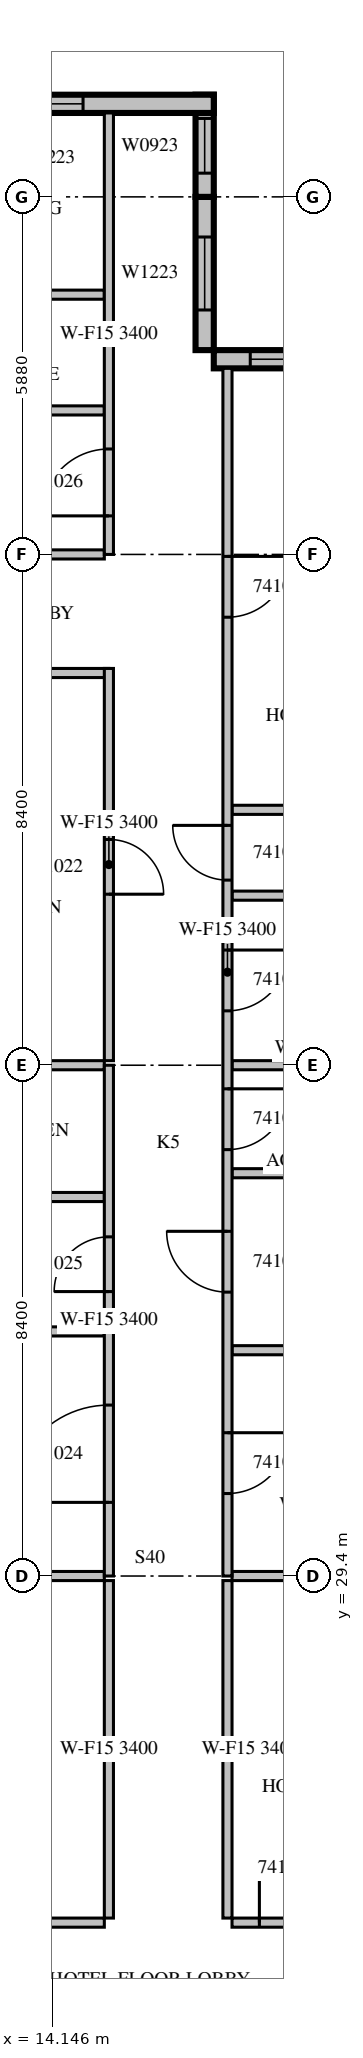
"""IFC4 building model, lengths in metres.
Left out: names, types, materials, properties, quantities, classifications, styles, units other than length and angle.
Written with IfcOpenShell. Run it as: python <this file> out.ifc"""

import sys

from ifc_helpers import new_model, si_unit, direction, frame, frame_2d, origin, place, context, subcontext, project, spatial, rectangle, extrude, source, transform, mapped, element, fill, save


model = new_model("IFC4")
c1 = context("Model", 3, precision=1e-05, world=origin(), true_north=direction((0.0, 1.0)))
c2 = subcontext(c1, "Body", "Model", "MODEL_VIEW")
j1 = project(units=[si_unit("LENGTHUNIT", "METRE"), si_unit("PLANEANGLEUNIT", "RADIAN")], contexts=[c1])
p1 = place(None, origin())
s1 = spatial("IfcSite", under=j1, at=p1, CompositionType="ELEMENT")
p2 = place(p1, origin())
s2 = spatial("IfcBuilding", under=s1, at=p2, CompositionType="ELEMENT")
p3 = place(p2, frame((0.0, 0.0, 189.2)))
s3 = spatial("IfcBuildingStorey", under=s2, at=p3, CompositionType="ELEMENT", Elevation=189.2)
m1 = source(origin(), c2, "Body", "SweptSolid", [
    extrude(rectangle(XDim=4.2, YDim=0.3, at=frame_2d((2.1, 0.0))), origin(), (0.0, 0.0, 1.0), 3.4),
])
p4 = place(p3, frame((21.0, 49.41, 0.0), z_axis=(0.0, 0.0, 1.0), x_axis=(-1.0, 0.0, 0.0)))
e1 = element("IfcWall", 1, at=p4, inside=s3, PredefinedType="STANDARD", context=c2, shape_type="MappedRepresentation", body=[
    mapped(m1, transform((0.0, 0.0, 0.0), scale=1.0)),
])
m2 = source(origin(), c2, "Body", "SweptSolid", [
    extrude(rectangle(XDim=3.0, YDim=2.3, at=frame_2d((1.5, 1.15))), frame((0.0, 0.16, 0.0), z_axis=(0.0, -1.0, 0.0), x_axis=(1.0, 0.0, 0.0)), (0.0, 0.0, 1.0), 0.32),
])
p5 = place(p4, frame((0.6, 0.0, 0.6)))
e2 = element("IfcOpeningElement", 2, at=p5, cuts=e1, PredefinedType="OPENING", context=c2, shape_type="MappedRepresentation", body=[
    mapped(m2, transform((0.0, 0.0, 0.0), scale=1.0)),
])
m3 = source(origin(), c2, "Body", "SweptSolid", [
    extrude(rectangle(XDim=2.52, YDim=0.3, at=frame_2d((1.26, 0.0))), origin(), (0.0, 0.0, 1.0), 3.4),
])
p6 = place(p3, frame((16.65, 49.56, 0.0), z_axis=(0.0, 0.0, 1.0), x_axis=(0.0, 1.0, 0.0)))
e3 = element("IfcWall", 3, at=p6, inside=s3, PredefinedType="STANDARD", context=c2, shape_type="MappedRepresentation", body=[
    mapped(m3, transform((0.0, 0.0, 0.0), scale=1.0)),
])
m4 = source(origin(), c2, "Body", "SweptSolid", [
    extrude(rectangle(XDim=1.2, YDim=2.3, at=frame_2d((0.6, 1.15))), frame((0.0, 0.16, 0.0), z_axis=(0.0, -1.0, 0.0), x_axis=(1.0, 0.0, 0.0)), (0.0, 0.0, 1.0), 0.32),
])
p7 = place(p6, frame((0.66, 0.0, 0.6)))
e4 = element("IfcOpeningElement", 4, at=p7, cuts=e3, PredefinedType="OPENING", context=c2, shape_type="MappedRepresentation", body=[
    mapped(m4, transform((0.0, 0.0, 0.0), scale=1.0)),
])
m5 = source(origin(), c2, "Body", "SweptSolid", [
    extrude(rectangle(XDim=1.68, YDim=0.3, at=frame_2d((0.84, 0.0))), origin(), (0.0, 0.0, 1.0), 3.4),
])
p8 = place(p3, frame((16.65, 52.08, 0.0), z_axis=(0.0, 0.0, 1.0), x_axis=(0.0, 1.0, 0.0)))
e5 = element("IfcWall", 5, at=p8, inside=s3, PredefinedType="STANDARD", context=c2, shape_type="MappedRepresentation", body=[
    mapped(m5, transform((0.0, 0.0, 0.0), scale=1.0)),
])
m6 = source(origin(), c2, "Body", "SweptSolid", [
    extrude(rectangle(XDim=0.9, YDim=2.3, at=frame_2d((0.45, 1.15))), frame((0.0, 0.16, 0.0), z_axis=(0.0, -1.0, 0.0), x_axis=(1.0, 0.0, 0.0)), (0.0, 0.0, 1.0), 0.32),
])
p9 = place(p8, frame((0.39, 0.0, 0.6)))
e6 = element("IfcOpeningElement", 6, at=p9, cuts=e5, PredefinedType="OPENING", context=c2, shape_type="MappedRepresentation", body=[
    mapped(m6, transform((0.0, 0.0, 0.0), scale=1.0)),
])
m7 = source(origin(), c2, "Body", "SweptSolid", [
    extrude(rectangle(XDim=10.5, YDim=0.3, at=frame_2d((5.25, 0.0))), origin(), (0.0, 0.0, 1.0), 3.4),
])
p10 = place(p3, frame((16.8, 53.61, 0.0), z_axis=(0.0, 0.0, 1.0), x_axis=(-1.0, 0.0, 0.0)))
e7 = element("IfcWall", 7, at=p10, inside=s3, PredefinedType="STANDARD", context=c2, shape_type="MappedRepresentation", body=[
    mapped(m7, transform((0.0, 0.0, 0.0), scale=1.0)),
])
p11 = place(p10, frame((2.15, 0.0, 0.6)))
e8 = element("IfcOpeningElement", 8, at=p11, cuts=e7, PredefinedType="OPENING", context=c2, shape_type="MappedRepresentation", body=[
    mapped(m4, transform((0.0, 0.0, 0.0), scale=1.0)),
])
m8 = source(origin(), c2, "Body", "SweptSolid", [
    extrude(rectangle(XDim=1.8, YDim=2.3, at=frame_2d((0.9, 1.15))), frame((0.0, 0.16, 0.0), z_axis=(0.0, -1.0, 0.0), x_axis=(1.0, 0.0, 0.0)), (0.0, 0.0, 1.0), 0.32),
])
p12 = place(p10, frame((8.025, 0.0, 0.6)))
e9 = element("IfcOpeningElement", 9, at=p12, cuts=e7, PredefinedType="OPENING", context=c2, shape_type="MappedRepresentation", body=[
    mapped(m8, transform((0.0, 0.0, 0.0), scale=1.0)),
])
m9 = source(origin(), c2, "Body", "SweptSolid", [
    extrude(rectangle(XDim=4.295, YDim=0.15, at=frame_2d((2.147, 0.0))), origin(), (0.0, 0.0, 1.0), 3.4),
])
p13 = place(p3, frame((10.705, 23.7, 0.0), z_axis=(0.0, 0.0, 1.0), x_axis=(1.0, 0.0, 0.0)))
e10 = element("IfcWall", 10, at=p13, inside=s3, PredefinedType="PARTITIONING", context=c2, shape_type="MappedRepresentation", body=[
    mapped(m9, transform((0.0, 0.0, 0.0), scale=1.0)),
])
m10 = source(origin(), c2, "Body", "SweptSolid", [
    extrude(rectangle(XDim=0.9, YDim=2.1, at=frame_2d((0.45, 1.05))), frame((0.0, 0.085, 0.0), z_axis=(0.0, -1.0, 0.0), x_axis=(1.0, 0.0, 0.0)), (0.0, 0.0, 1.0), 0.17),
])
p14 = place(p13, frame((2.283, 0.0, 0.0)))
e11 = element("IfcOpeningElement", 11, at=p14, cuts=e10, PredefinedType="OPENING", context=c2, shape_type="MappedRepresentation", body=[
    mapped(m10, transform((0.0, 0.0, 0.0), scale=1.0)),
])
m11 = source(origin(), c2, "Body", "SweptSolid", [
    extrude(rectangle(XDim=3.6, YDim=0.15, at=frame_2d((1.8, 0.0))), origin(), (0.0, 0.0, 1.0), 3.4),
])
p15 = place(p3, frame((17.1, 23.7, 0.0), z_axis=(0.0, 0.0, 1.0), x_axis=(1.0, 0.0, 0.0)))
e12 = element("IfcWall", 12, at=p15, inside=s3, PredefinedType="PARTITIONING", context=c2, shape_type="MappedRepresentation", body=[
    mapped(m11, transform((0.0, 0.0, 0.0), scale=1.0)),
])
p16 = place(p15, frame((0.45, 0.0, 0.0)))
e13 = element("IfcOpeningElement", 13, at=p16, cuts=e12, PredefinedType="OPENING", context=c2, shape_type="MappedRepresentation", body=[
    mapped(m10, transform((0.0, 0.0, 0.0), scale=1.0)),
])
m12 = source(origin(), c2, "Body", "SweptSolid", [
    extrude(rectangle(XDim=5.55, YDim=0.15, at=frame_2d((2.775, 0.0))), origin(), (0.0, 0.0, 1.0), 3.4),
])
for number, where, z_axis, x_axis in (
    (14, (15.075, 23.775, 0.0), (0.0, 0.0, 1.0), (0.0, 1.0, 0.0)),
    (15, (17.025, 29.325, 0.0), (0.0, 0.0, 1.0), (0.0, -1.0, 0.0)),
):
    element("IfcWall", number, at=place(p3, frame(where, z_axis=z_axis, x_axis=x_axis)), inside=s3, PredefinedType="PARTITIONING", context=c2, shape_type="MappedRepresentation", body=[
        mapped(m12, transform((0.0, 0.0, 0.0), scale=1.0)),
    ])
m13 = source(origin(), c2, "Body", "SweptSolid", [
    extrude(rectangle(XDim=4.051, YDim=0.15, at=frame_2d((2.026, 0.0))), origin(), (0.0, 0.0, 1.0), 3.4),
])
p17 = place(p3, frame((15.0, 29.4, 0.0), z_axis=(0.0, 0.0, 1.0), x_axis=(-1.0, 0.0, 0.0)))
e16 = element("IfcWall", 16, at=p17, inside=s3, PredefinedType="PARTITIONING", context=c2, shape_type="MappedRepresentation", body=[
    mapped(m13, transform((0.0, 0.0, 0.0), scale=1.0)),
])
m14 = source(origin(), c2, "Body", "SweptSolid", [
    extrude(rectangle(XDim=3.001, YDim=0.15, at=frame_2d((1.5, 0.0))), origin(), (0.0, 0.0, 1.0), 3.4),
])
p18 = place(p3, frame((20.101, 29.4, 0.0), z_axis=(0.0, 0.0, 1.0), x_axis=(-1.0, 0.0, 0.0)))
e17 = element("IfcWall", 17, at=p18, inside=s3, PredefinedType="PARTITIONING", context=c2, shape_type="MappedRepresentation", body=[
    mapped(m14, transform((0.0, 0.0, 0.0), scale=1.0)),
])
m15 = source(origin(), c2, "Body", "SweptSolid", [
    extrude(rectangle(XDim=3.175, YDim=0.15, at=frame_2d((1.587, 0.0))), origin(), (0.0, 0.0, 1.0), 3.4),
])
p19 = place(p3, frame((15.075, 44.25, 0.0), z_axis=(0.0, 0.0, 1.0), x_axis=(-1.0, 0.0, 0.0)))
e18 = element("IfcWall", 18, at=p19, inside=s3, PredefinedType="PARTITIONING", context=c2, shape_type="MappedRepresentation", body=[
    mapped(m15, transform((0.0, 0.0, 0.0), scale=1.0)),
])
m16 = source(origin(), c2, "Body", "SweptSolid", [
    extrude(rectangle(XDim=6.45, YDim=0.15, at=frame_2d((3.225, 0.0))), origin(), (0.0, 0.0, 1.0), 3.4),
])
p20 = place(p3, frame((15.075, 37.875, 0.0), z_axis=(0.0, 0.0, 1.0), x_axis=(0.0, 1.0, 0.0)))
e19 = element("IfcWall", 19, at=p20, inside=s3, PredefinedType="PARTITIONING", context=c2, shape_type="MappedRepresentation", body=[
    mapped(m16, transform((0.0, 0.0, 0.0), scale=1.0)),
])
p21 = place(p20, frame((2.737, 0.0, 0.0)))
e20 = element("IfcOpeningElement", 20, at=p21, cuts=e19, PredefinedType="OPENING", context=c2, shape_type="MappedRepresentation", body=[
    mapped(m10, transform((0.0, 0.0, 0.0), scale=1.0)),
])
p22 = place(p3, frame((15.0, 33.422, 0.0), z_axis=(0.0, 0.0, 1.0), x_axis=(-1.0, 0.0, 0.0)))
e21 = element("IfcWall", 21, at=p22, inside=s3, PredefinedType="PARTITIONING", context=c2, shape_type="MappedRepresentation", body=[
    mapped(m9, transform((0.0, 0.0, 0.0), scale=1.0)),
])
p23 = place(p3, frame((15.0, 35.633, 0.0), z_axis=(0.0, 0.0, 1.0), x_axis=(-1.0, 0.0, 0.0)))
e22 = element("IfcWall", 22, at=p23, inside=s3, PredefinedType="PARTITIONING", context=c2, shape_type="MappedRepresentation", body=[
    mapped(m9, transform((0.0, 0.0, 0.0), scale=1.0)),
])
p24 = place(p23, frame((1.698, 0.0, 0.0)))
e23 = element("IfcOpeningElement", 23, at=p24, cuts=e22, PredefinedType="OPENING", context=c2, shape_type="MappedRepresentation", body=[
    mapped(m10, transform((0.0, 0.0, 0.0), scale=1.0)),
])
p25 = place(p3, frame((15.0, 37.8, 0.0), z_axis=(0.0, 0.0, 1.0), x_axis=(-1.0, 0.0, 0.0)))
e24 = element("IfcWall", 24, at=p25, inside=s3, PredefinedType="PARTITIONING", context=c2, shape_type="MappedRepresentation", body=[
    mapped(m13, transform((0.0, 0.0, 0.0), scale=1.0)),
])
m17 = source(origin(), c2, "Body", "SweptSolid", [
    extrude(rectangle(XDim=3.9, YDim=0.15, at=frame_2d((1.95, 0.0))), origin(), (0.0, 0.0, 1.0), 3.4),
])
for number, where, z_axis, x_axis in (
    (25, (15.0, 48.568, 0.0), (0.0, 0.0, 1.0), (-1.0, 0.0, 0.0)),
    (26, (15.0, 50.472, 0.0), (0.0, 0.0, 1.0), (-1.0, 0.0, 0.0)),
    (27, (15.0, 46.2, 0.0), (0.0, 0.0, 1.0), (-1.0, 0.0, 0.0)),
):
    element("IfcWall", number, at=place(p3, frame(where, z_axis=z_axis, x_axis=x_axis)), inside=s3, PredefinedType="PARTITIONING", context=c2, shape_type="MappedRepresentation", body=[
        mapped(m17, transform((0.0, 0.0, 0.0), scale=1.0)),
    ])
for number, where, z_axis, x_axis in (
    (28, (17.1, 33.113, 0.0), (0.0, 0.0, 1.0), (1.0, 0.0, 0.0)),
    (29, (17.1, 36.024, 0.0), (0.0, 0.0, 1.0), (1.0, 0.0, 0.0)),
    (30, (17.1, 40.589, 0.0), (0.0, 0.0, 1.0), (1.0, 0.0, 0.0)),
):
    element("IfcWall", number, at=place(p3, frame(where, z_axis=z_axis, x_axis=x_axis)), inside=s3, PredefinedType="PARTITIONING", context=c2, shape_type="MappedRepresentation", body=[
        mapped(m11, transform((0.0, 0.0, 0.0), scale=1.0)),
    ])
p26 = place(p3, frame((20.101, 37.8, 0.0), z_axis=(0.0, 0.0, 1.0), x_axis=(-1.0, 0.0, 0.0)))
e31 = element("IfcWall", 31, at=p26, inside=s3, PredefinedType="PARTITIONING", context=c2, shape_type="MappedRepresentation", body=[
    mapped(m14, transform((0.0, 0.0, 0.0), scale=1.0)),
])
p27 = place(p3, frame((20.7, 42.0, 0.0), z_axis=(0.0, 0.0, 1.0), x_axis=(-1.0, 0.0, 0.0)))
e32 = element("IfcWall", 32, at=p27, inside=s3, PredefinedType="PARTITIONING", context=c2, shape_type="MappedRepresentation", body=[
    mapped(m11, transform((0.0, 0.0, 0.0), scale=1.0)),
])
m18 = source(origin(), c2, "Body", "SweptSolid", [
    extrude(rectangle(XDim=8.4, YDim=0.15, at=frame_2d((4.2, 0.0))), origin(), (0.0, 0.0, 1.0), 3.4),
])
p28 = place(p3, frame((15.075, 29.4, 0.0), z_axis=(0.0, 0.0, 1.0), x_axis=(0.0, 1.0, 0.0)))
e33 = element("IfcWall", 33, at=p28, inside=s3, PredefinedType="PARTITIONING", context=c2, shape_type="MappedRepresentation", body=[
    mapped(m18, transform((0.0, 0.0, 0.0), scale=1.0)),
])
m19 = source(origin(), c2, "Body", "SweptSolid", [
    extrude(rectangle(XDim=1.6, YDim=2.1, at=frame_2d((0.8, 1.05))), frame((0.0, 0.085, 0.0), z_axis=(0.0, -1.0, 0.0), x_axis=(1.0, 0.0, 0.0)), (0.0, 0.0, 1.0), 0.17),
])
p29 = place(p28, frame((1.211, 0.0, 0.0)))
e34 = element("IfcOpeningElement", 34, at=p29, cuts=e33, PredefinedType="OPENING", context=c2, shape_type="MappedRepresentation", body=[
    mapped(m19, transform((0.0, 0.0, 0.0), scale=1.0)),
])
p30 = place(p28, frame((4.678, 0.0, 0.0)))
e35 = element("IfcOpeningElement", 35, at=p30, cuts=e33, PredefinedType="OPENING", context=c2, shape_type="MappedRepresentation", body=[
    mapped(m10, transform((0.0, 0.0, 0.0), scale=1.0)),
])
m20 = source(origin(), c2, "Body", "SweptSolid", [
    extrude(rectangle(XDim=7.26, YDim=0.15, at=frame_2d((3.63, 0.0))), origin(), (0.0, 0.0, 1.0), 3.4),
])
p31 = place(p3, frame((15.075, 46.2, 0.0), z_axis=(0.0, 0.0, 1.0), x_axis=(0.0, 1.0, 0.0)))
e36 = element("IfcWall", 36, at=p31, inside=s3, PredefinedType="PARTITIONING", context=c2, shape_type="MappedRepresentation", body=[
    mapped(m20, transform((0.0, 0.0, 0.0), scale=1.0)),
])
m21 = source(origin(), c2, "Body", "SweptSolid", [
    extrude(rectangle(XDim=1.1, YDim=2.1, at=frame_2d((0.55, 1.05))), frame((0.0, 0.085, 0.0), z_axis=(0.0, -1.0, 0.0), x_axis=(1.0, 0.0, 0.0)), (0.0, 0.0, 1.0), 0.17),
])
p32 = place(p31, frame((0.634, 0.0, 0.0)))
e37 = element("IfcOpeningElement", 37, at=p32, cuts=e36, PredefinedType="OPENING", context=c2, shape_type="MappedRepresentation", body=[
    mapped(m21, transform((0.0, 0.0, 0.0), scale=1.0)),
])
m22 = source(origin(), c2, "Body", "SweptSolid", [
    extrude(rectangle(XDim=19.86, YDim=0.15, at=frame_2d((9.93, 0.0))), origin(), (0.0, 0.0, 1.0), 3.4),
])
p33 = place(p3, frame((17.025, 49.26, 0.0), z_axis=(0.0, 0.0, 1.0), x_axis=(0.0, -1.0, 0.0)))
e38 = element("IfcWall", 38, at=p33, inside=s3, PredefinedType="PARTITIONING", context=c2, shape_type="MappedRepresentation", body=[
    mapped(m22, transform((0.0, 0.0, 0.0), scale=1.0)),
])
m23 = source(origin(), c2, "Body", "SweptSolid", [
    extrude(rectangle(XDim=1.0, YDim=2.1, at=frame_2d((0.5, 1.05))), frame((0.0, 0.085, 0.0), z_axis=(0.0, -1.0, 0.0), x_axis=(1.0, 0.0, 0.0)), (0.0, 0.0, 1.0), 0.17),
])
p34 = place(p33, frame((17.503, 0.0, 0.0)))
e39 = element("IfcOpeningElement", 39, at=p34, cuts=e38, PredefinedType="OPENING", context=c2, shape_type="MappedRepresentation", body=[
    mapped(m23, transform((0.0, 0.0, 0.0), scale=1.0)),
])
p35 = place(p33, frame((14.191, 0.0, 0.0)))
e40 = element("IfcOpeningElement", 40, at=p35, cuts=e38, PredefinedType="OPENING", context=c2, shape_type="MappedRepresentation", body=[
    mapped(m23, transform((0.0, 0.0, 0.0), scale=1.0)),
])
p36 = place(p33, frame((11.848, 0.0, 0.0)))
e41 = element("IfcOpeningElement", 41, at=p36, cuts=e38, PredefinedType="OPENING", context=c2, shape_type="MappedRepresentation", body=[
    mapped(m23, transform((0.0, 0.0, 0.0), scale=1.0)),
])
p37 = place(p33, frame((9.566, 0.0, 0.0)))
e42 = element("IfcOpeningElement", 42, at=p37, cuts=e38, PredefinedType="OPENING", context=c2, shape_type="MappedRepresentation", body=[
    mapped(m23, transform((0.0, 0.0, 0.0), scale=1.0)),
])
p38 = place(p33, frame((7.516, 0.0, 0.0)))
e43 = element("IfcOpeningElement", 43, at=p38, cuts=e38, PredefinedType="OPENING", context=c2, shape_type="MappedRepresentation", body=[
    mapped(m10, transform((0.0, 0.0, 0.0), scale=1.0)),
])
p39 = place(p33, frame((3.092, 0.0, 0.0)))
e44 = element("IfcOpeningElement", 44, at=p39, cuts=e38, PredefinedType="OPENING", context=c2, shape_type="MappedRepresentation", body=[
    mapped(m23, transform((0.0, 0.0, 0.0), scale=1.0)),
])
m24 = source(origin(), c2, "Body", "SweptSolid", [
    extrude(rectangle(XDim=3.0, YDim=2.3, at=frame_2d((1.5, 1.15))), frame((0.0, 0.03, 0.0), z_axis=(0.0, -1.0, 0.0), x_axis=(1.0, 0.0, 0.0)), (0.0, 0.0, 1.0), 0.06),
])
p40 = place(p5, origin())
e45 = element("IfcWindow", 45, at=p40, inside=s3, PartitioningType="SINGLE_PANEL", PredefinedType="WINDOW", context=c2, shape_type="MappedRepresentation", body=[
    mapped(m24, transform((0.0, 0.0, 0.0), scale=1.0)),
])
fill(e2, e45)
m25 = source(origin(), c2, "Body", "SweptSolid", [
    extrude(rectangle(XDim=1.2, YDim=2.3, at=frame_2d((0.6, 1.15))), frame((0.0, 0.03, 0.0), z_axis=(0.0, -1.0, 0.0), x_axis=(1.0, 0.0, 0.0)), (0.0, 0.0, 1.0), 0.06),
])
p41 = place(p7, origin())
e46 = element("IfcWindow", 46, at=p41, inside=s3, PartitioningType="SINGLE_PANEL", PredefinedType="WINDOW", context=c2, shape_type="MappedRepresentation", body=[
    mapped(m25, transform((0.0, 0.0, 0.0), scale=1.0)),
])
fill(e4, e46)
m26 = source(origin(), c2, "Body", "SweptSolid", [
    extrude(rectangle(XDim=0.9, YDim=2.3, at=frame_2d((0.45, 1.15))), frame((0.0, 0.03, 0.0), z_axis=(0.0, -1.0, 0.0), x_axis=(1.0, 0.0, 0.0)), (0.0, 0.0, 1.0), 0.06),
])
p42 = place(p9, origin())
e47 = element("IfcWindow", 47, at=p42, inside=s3, PartitioningType="SINGLE_PANEL", PredefinedType="WINDOW", context=c2, shape_type="MappedRepresentation", body=[
    mapped(m26, transform((0.0, 0.0, 0.0), scale=1.0)),
])
fill(e6, e47)
p43 = place(p11, origin())
e48 = element("IfcWindow", 48, at=p43, inside=s3, PartitioningType="SINGLE_PANEL", PredefinedType="WINDOW", context=c2, shape_type="MappedRepresentation", body=[
    mapped(m25, transform((0.0, 0.0, 0.0), scale=1.0)),
])
fill(e8, e48)
m27 = source(origin(), c2, "Body", "SweptSolid", [
    extrude(rectangle(XDim=0.9, YDim=2.1, at=frame_2d((0.45, 1.05))), frame((0.0, 0.025, 0.0), z_axis=(0.0, -1.0, 0.0), x_axis=(1.0, 0.0, 0.0)), (0.0, 0.0, 1.0), 0.05),
])
p44 = place(p16, origin())
e49 = element("IfcDoor", 49, at=p44, inside=s3, OperationType="SINGLE_SWING_LEFT", PredefinedType="DOOR", context=c2, shape_type="MappedRepresentation", body=[
    mapped(m27, transform((0.0, 0.0, 0.0), scale=1.0)),
])
fill(e13, e49)
p45 = place(p21, origin())
e50 = element("IfcDoor", 50, at=p45, inside=s3, OperationType="SINGLE_SWING_RIGHT", PredefinedType="DOOR", context=c2, shape_type="MappedRepresentation", body=[
    mapped(m27, transform((0.0, 0.0, 0.0), scale=1.0)),
])
fill(e20, e50)
m28 = source(origin(), c2, "Body", "SweptSolid", [
    extrude(rectangle(XDim=1.6, YDim=2.1, at=frame_2d((0.8, 1.05))), frame((0.0, 0.025, 0.0), z_axis=(0.0, -1.0, 0.0), x_axis=(1.0, 0.0, 0.0)), (0.0, 0.0, 1.0), 0.05),
])
p46 = place(p29, origin())
e51 = element("IfcDoor", 51, at=p46, inside=s3, OperationType="SINGLE_SWING_LEFT", PredefinedType="DOOR", context=c2, shape_type="MappedRepresentation", body=[
    mapped(m28, transform((0.0, 0.0, 0.0), scale=1.0)),
])
fill(e34, e51)
p47 = place(p30, origin())
e52 = element("IfcDoor", 52, at=p47, inside=s3, OperationType="SINGLE_SWING_LEFT", PredefinedType="DOOR", context=c2, shape_type="MappedRepresentation", body=[
    mapped(m27, transform((0.0, 0.0, 0.0), scale=1.0)),
])
fill(e35, e52)
m29 = source(origin(), c2, "Body", "SweptSolid", [
    extrude(rectangle(XDim=1.1, YDim=2.1, at=frame_2d((0.55, 1.05))), frame((0.0, 0.025, 0.0), z_axis=(0.0, -1.0, 0.0), x_axis=(1.0, 0.0, 0.0)), (0.0, 0.0, 1.0), 0.05),
])
p48 = place(p32, origin())
e53 = element("IfcDoor", 53, at=p48, inside=s3, OperationType="SINGLE_SWING_LEFT", PredefinedType="DOOR", context=c2, shape_type="MappedRepresentation", body=[
    mapped(m29, transform((0.0, 0.0, 0.0), scale=1.0)),
])
fill(e37, e53)
m30 = source(origin(), c2, "Body", "SweptSolid", [
    extrude(rectangle(XDim=1.0, YDim=2.1, at=frame_2d((0.5, 1.05))), frame((0.0, 0.025, 0.0), z_axis=(0.0, -1.0, 0.0), x_axis=(1.0, 0.0, 0.0)), (0.0, 0.0, 1.0), 0.05),
])
p49 = place(p34, origin())
e54 = element("IfcDoor", 54, at=p49, inside=s3, OperationType="SINGLE_SWING_LEFT", PredefinedType="DOOR", context=c2, shape_type="MappedRepresentation", body=[
    mapped(m30, transform((0.0, 0.0, 0.0), scale=1.0)),
])
fill(e39, e54)
p50 = place(p35, origin())
e55 = element("IfcDoor", 55, at=p50, inside=s3, OperationType="SINGLE_SWING_RIGHT", PredefinedType="DOOR", context=c2, shape_type="MappedRepresentation", body=[
    mapped(m30, transform((0.0, 0.0, 0.0), scale=1.0)),
])
fill(e40, e55)
p51 = place(p36, origin())
e56 = element("IfcDoor", 56, at=p51, inside=s3, OperationType="SINGLE_SWING_LEFT", PredefinedType="DOOR", context=c2, shape_type="MappedRepresentation", body=[
    mapped(m30, transform((0.0, 0.0, 0.0), scale=1.0)),
])
fill(e41, e56)
p52 = place(p37, origin())
e57 = element("IfcDoor", 57, at=p52, inside=s3, OperationType="SINGLE_SWING_LEFT", PredefinedType="DOOR", context=c2, shape_type="MappedRepresentation", body=[
    mapped(m30, transform((0.0, 0.0, 0.0), scale=1.0)),
])
fill(e42, e57)
p53 = place(p38, origin())
e58 = element("IfcDoor", 58, at=p53, inside=s3, OperationType="SINGLE_SWING_RIGHT", PredefinedType="DOOR", context=c2, shape_type="MappedRepresentation", body=[
    mapped(m27, transform((0.0, 0.0, 0.0), scale=1.0)),
])
fill(e43, e58)
p54 = place(p39, origin())
e59 = element("IfcDoor", 59, at=p54, inside=s3, OperationType="SINGLE_SWING_LEFT", PredefinedType="DOOR", context=c2, shape_type="MappedRepresentation", body=[
    mapped(m30, transform((0.0, 0.0, 0.0), scale=1.0)),
])
fill(e44, e59)
save(model, sys.argv[1])
